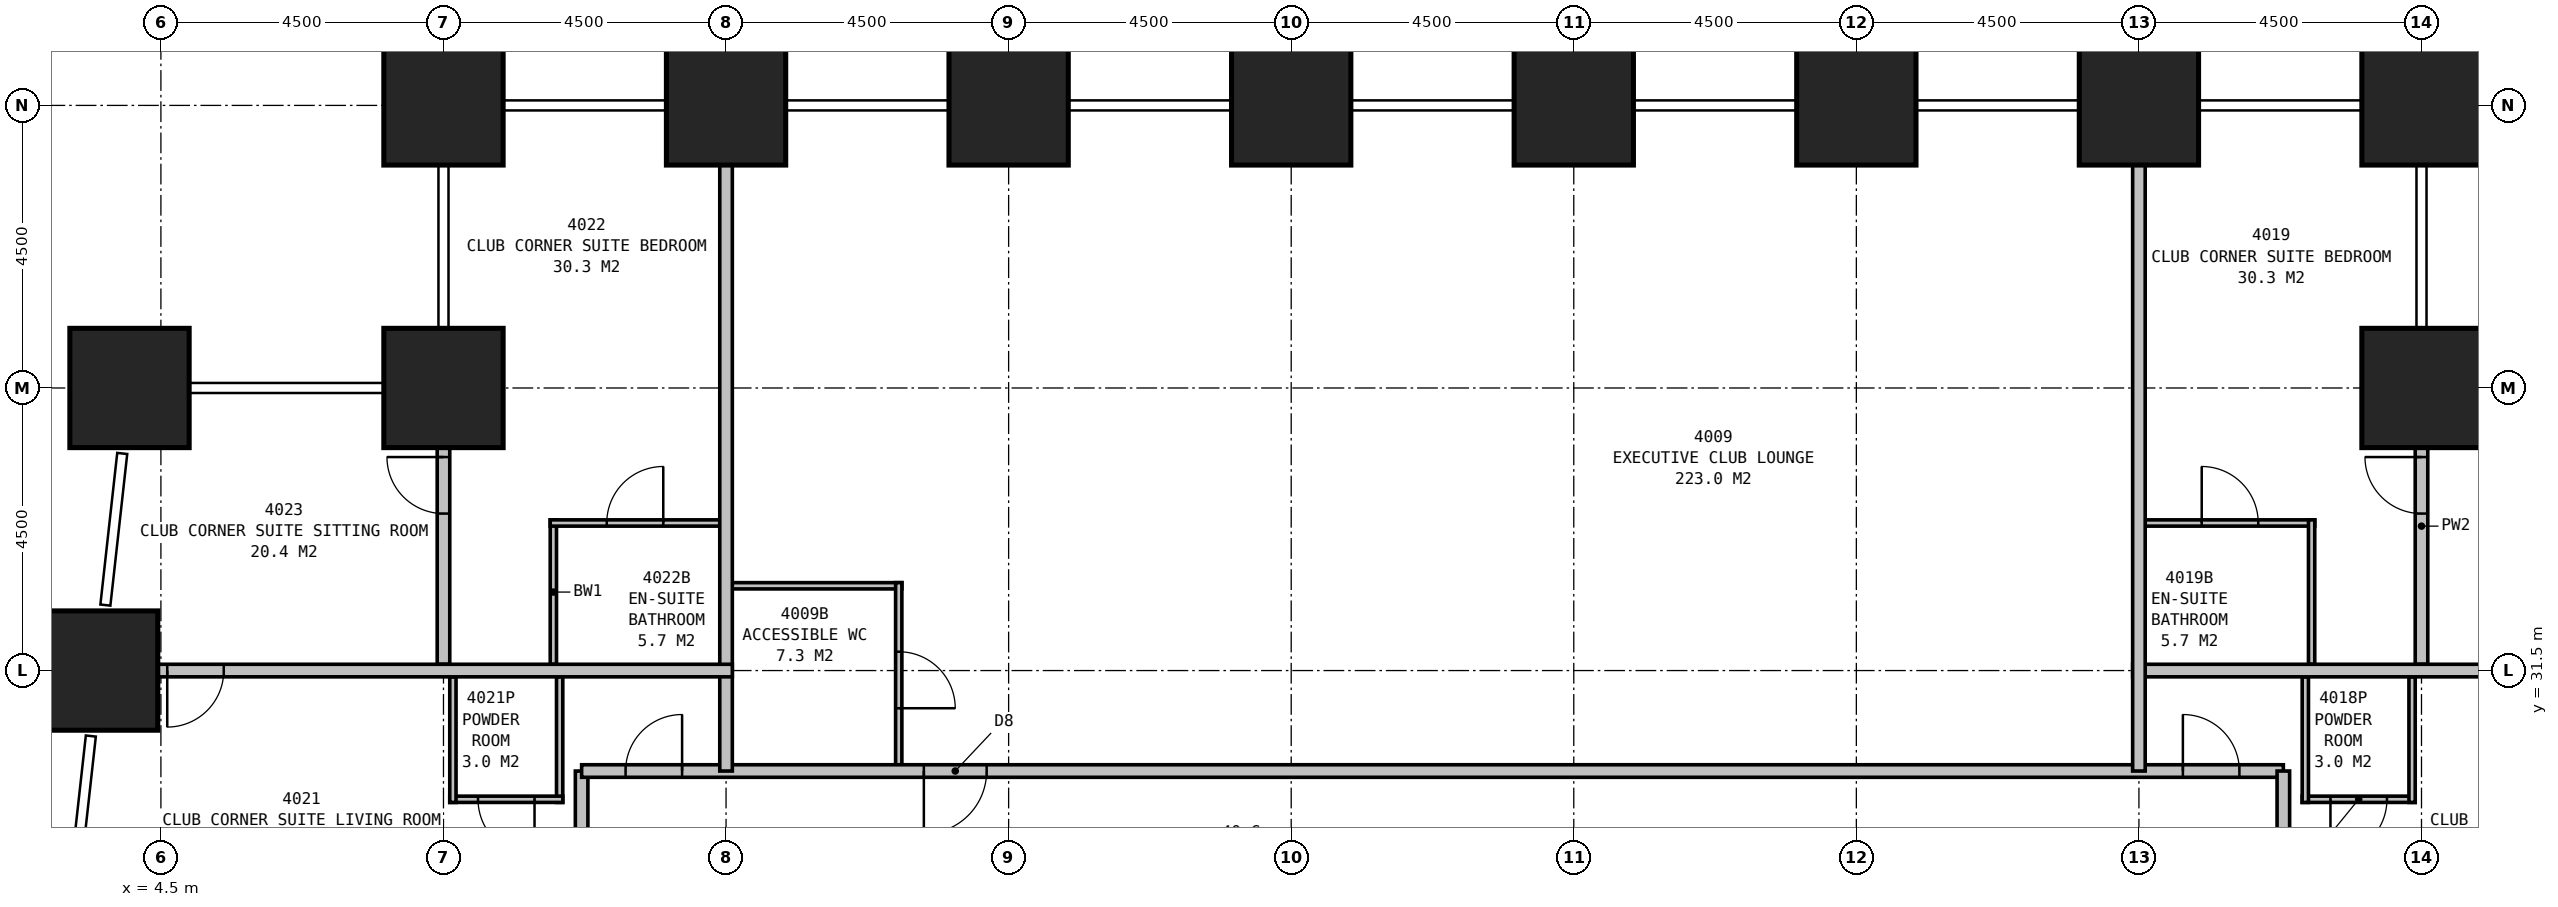
"""IFC4 building model, lengths in metres.
Left out: names, types, materials, properties, quantities, classifications, styles, units other than length and angle.
Written with IfcOpenShell. Run it as: python <this file> out.ifc"""

import sys

from ifc_helpers import new_model, si_unit, direction, frame, frame_2d, origin, origin_2d, place, context, subcontext, project, spatial, rectangle, extrude, element, fill, save


model = new_model("IFC4")
c1 = context("Model", 3, precision=1e-05, world=origin(), true_north=direction((0.0, 1.0)))
c2 = subcontext(c1, "Body", "Model", "MODEL_VIEW")
j1 = project(units=[si_unit("LENGTHUNIT", "METRE"), si_unit("PLANEANGLEUNIT", "RADIAN")], contexts=[c1])
p1 = place(None, origin())
s1 = spatial("IfcSite", under=j1, at=p1, CompositionType="ELEMENT")
p2 = place(p1, origin())
s2 = spatial("IfcBuilding", under=s1, at=p2, CompositionType="ELEMENT")
p3 = place(p2, frame((0.0, 0.0, 157.9)))
s3 = spatial("IfcBuildingStorey", under=s2, at=p3, CompositionType="ELEMENT", Elevation=157.9)
for number, where, z_axis, x_axis in (
    (1, (40.5, 36.0, 0.0), (0.0, 0.0, 1.0), (1.0, 0.0, 0.0)),
    (2, (40.5, 40.5, 0.0), (0.0, 0.0, 1.0), (1.0, 0.0, 0.0)),
    (3, (36.0, 40.5, 0.0), (0.0, 0.0, 1.0), (1.0, 0.0, 0.0)),
    (4, (31.5, 40.5, 0.0), (0.0, 0.0, 1.0), (1.0, 0.0, 0.0)),
    (5, (27.0, 40.5, 0.0), (0.0, 0.0, 1.0), (1.0, 0.0, 0.0)),
    (6, (22.5, 40.5, 0.0), (0.0, 0.0, 1.0), (1.0, 0.0, 0.0)),
    (7, (18.0, 40.5, 0.0), (0.0, 0.0, 1.0), (1.0, 0.0, 0.0)),
    (8, (13.5, 40.5, 0.0), (0.0, 0.0, 1.0), (1.0, 0.0, 0.0)),
    (9, (9.0, 40.5, 0.0), (0.0, 0.0, 1.0), (1.0, 0.0, 0.0)),
    (10, (9.0, 36.0, 0.0), (0.0, 0.0, 1.0), (1.0, 0.0, 0.0)),
    (11, (4.0, 36.0, 0.0), (0.0, 0.0, 1.0), (1.0, 0.0, 0.0)),
    (12, (3.5, 31.5, 0.0), (0.0, 0.0, 1.0), (1.0, 0.0, 0.0)),
):
    element("IfcColumn", number, at=place(p3, frame(where, z_axis=z_axis, x_axis=x_axis)), inside=s3, PredefinedType="COLUMN", context=c2, shape_type="SweptSolid", body=[
        extrude(rectangle(XDim=1.9, YDim=1.9, at=origin_2d()), origin(), (0.0, 0.0, 1.0), 4.5),
    ])
p4 = place(p3, frame((11.2, 29.9, 0.0), z_axis=(0.0, 0.0, 1.0), x_axis=(1.0, 0.0, 0.0)))
e13 = element("IfcWall", 13, at=p4, inside=s3, PredefinedType="PARTITIONING", context=c2, shape_type="SweptSolid", body=[
    extrude(rectangle(XDim=27.1, YDim=0.2, at=frame_2d((13.55, 0.0))), origin(), (0.0, 0.0, 1.0), 4.25),
])
p5 = place(p4, frame((6.45, 0.0, 0.0), z_axis=(0.0, 0.0, 1.0), x_axis=(-1.0, 0.0, 0.0)))
e14 = element("IfcOpeningElement", 14, at=p5, cuts=e13, PredefinedType="OPENING", context=c2, shape_type="SweptSolid", body=[
    extrude(rectangle(XDim=1.0, YDim=2.1, at=frame_2d((0.5, 1.05))), frame((0.0, 0.11, 0.0), z_axis=(0.0, -1.0, 0.0), x_axis=(1.0, 0.0, 0.0)), (0.0, 0.0, 1.0), 0.22),
])
p6 = place(p4, frame((25.5, 0.0, 0.0)))
e15 = element("IfcOpeningElement", 15, at=p6, cuts=e13, PredefinedType="OPENING", context=c2, shape_type="SweptSolid", body=[
    extrude(rectangle(XDim=0.9, YDim=2.1, at=frame_2d((0.45, 1.05))), frame((0.0, 0.11, 0.0), z_axis=(0.0, -1.0, 0.0), x_axis=(1.0, 0.0, 0.0)), (0.0, 0.0, 1.0), 0.22),
])
p7 = place(p4, frame((0.7, 0.0, 0.0)))
e16 = element("IfcOpeningElement", 16, at=p7, cuts=e13, PredefinedType="OPENING", context=c2, shape_type="SweptSolid", body=[
    extrude(rectangle(XDim=0.9, YDim=2.1, at=frame_2d((0.45, 1.05))), frame((0.0, 0.11, 0.0), z_axis=(0.0, -1.0, 0.0), x_axis=(1.0, 0.0, 0.0)), (0.0, 0.0, 1.0), 0.22),
])
p8 = place(p3, frame((11.2, 11.2, 0.0), z_axis=(0.0, 0.0, 1.0), x_axis=(0.0, 1.0, 0.0)))
e17 = element("IfcWall", 17, at=p8, inside=s3, PredefinedType="PARTITIONING", context=c2, shape_type="SweptSolid", body=[
    extrude(rectangle(XDim=18.7, YDim=0.2, at=frame_2d((9.35, 0.0))), origin(), (0.0, 0.0, 1.0), 4.25),
])
p9 = place(p8, frame((5.8, 0.0, 0.0)))
e18 = element("IfcOpeningElement", 18, at=p9, cuts=e17, PredefinedType="OPENING", context=c2, shape_type="SweptSolid", body=[
    extrude(rectangle(XDim=0.9, YDim=2.1, at=frame_2d((0.45, 1.05))), frame((0.0, 0.11, 0.0), z_axis=(0.0, -1.0, 0.0), x_axis=(1.0, 0.0, 0.0)), (0.0, 0.0, 1.0), 0.22),
])
p10 = place(p8, frame((9.55, 0.0, 0.0)))
e19 = element("IfcOpeningElement", 19, at=p10, cuts=e17, PredefinedType="OPENING", context=c2, shape_type="SweptSolid", body=[
    extrude(rectangle(XDim=0.9, YDim=2.1, at=frame_2d((0.45, 1.05))), frame((0.0, 0.11, 0.0), z_axis=(0.0, -1.0, 0.0), x_axis=(1.0, 0.0, 0.0)), (0.0, 0.0, 1.0), 0.22),
])
p11 = place(p3, frame((38.3, 11.2, 0.0), z_axis=(0.0, 0.0, 1.0), x_axis=(0.0, 1.0, 0.0)))
e20 = element("IfcWall", 20, at=p11, inside=s3, PredefinedType="PARTITIONING", context=c2, shape_type="SweptSolid", body=[
    extrude(rectangle(XDim=18.7, YDim=0.2, at=frame_2d((9.35, 0.0))), origin(), (0.0, 0.0, 1.0), 4.25),
])
p12 = place(p11, frame((6.35, 0.0, 0.0), z_axis=(0.0, 0.0, 1.0), x_axis=(-1.0, 0.0, 0.0)))
e21 = element("IfcOpeningElement", 21, at=p12, cuts=e20, PredefinedType="OPENING", context=c2, shape_type="SweptSolid", body=[
    extrude(rectangle(XDim=0.9, YDim=2.1, at=frame_2d((0.45, 1.05))), frame((0.0, 0.11, 0.0), z_axis=(0.0, -1.0, 0.0), x_axis=(1.0, 0.0, 0.0)), (0.0, 0.0, 1.0), 0.22),
])
p13 = place(p11, frame((10.45, 0.0, 0.0), z_axis=(0.0, 0.0, 1.0), x_axis=(-1.0, 0.0, 0.0)))
e22 = element("IfcOpeningElement", 22, at=p13, cuts=e20, PredefinedType="OPENING", context=c2, shape_type="SweptSolid", body=[
    extrude(rectangle(XDim=0.9, YDim=2.1, at=frame_2d((0.45, 1.05))), frame((0.0, 0.11, 0.0), z_axis=(0.0, -1.0, 0.0), x_axis=(1.0, 0.0, 0.0)), (0.0, 0.0, 1.0), 0.22),
])
p14 = place(p3, frame((13.5, 32.85, 0.0), z_axis=(0.0, 0.0, 1.0), x_axis=(1.0, 0.0, 0.0)))
e23 = element("IfcWall", 23, at=p14, inside=s3, PredefinedType="PLUMBINGWALL", context=c2, shape_type="SweptSolid", body=[
    extrude(rectangle(XDim=2.8, YDim=0.1, at=frame_2d((1.4, 0.0))), origin(), (0.0, 0.0, 1.0), 4.25),
])
p15 = place(p3, frame((16.25, 29.9, 0.0), z_axis=(0.0, 0.0, 1.0), x_axis=(0.0, 1.0, 0.0)))
e24 = element("IfcWall", 24, at=p15, inside=s3, PredefinedType="PLUMBINGWALL", context=c2, shape_type="SweptSolid", body=[
    extrude(rectangle(XDim=3.0, YDim=0.1, at=frame_2d((1.5, 0.0))), origin(), (0.0, 0.0, 1.0), 4.25),
])
p16 = place(p15, frame((1.9, 0.0, 0.0), z_axis=(0.0, 0.0, 1.0), x_axis=(-1.0, 0.0, 0.0)))
e25 = element("IfcOpeningElement", 25, at=p16, cuts=e24, PredefinedType="OPENING", context=c2, shape_type="SweptSolid", body=[
    extrude(rectangle(XDim=0.9, YDim=2.1, at=frame_2d((0.45, 1.05))), frame((0.0, 0.06, 0.0), z_axis=(0.0, -1.0, 0.0), x_axis=(1.0, 0.0, 0.0)), (0.0, 0.0, 1.0), 0.12),
])
p17 = place(p3, frame((36.0, 29.9, 0.0), z_axis=(0.0, 0.0, 1.0), x_axis=(0.0, 1.0, 0.0)))
e26 = element("IfcWall", 26, at=p17, inside=s3, PredefinedType="PARTITIONING", context=c2, shape_type="SweptSolid", body=[
    extrude(rectangle(XDim=10.6, YDim=0.2, at=frame_2d((5.3, 0.0))), origin(), (0.0, 0.0, 1.0), 3.25),
])
p18 = place(p3, frame((35.9, 31.5, 0.0), z_axis=(0.0, 0.0, 1.0), x_axis=(1.0, 0.0, 0.0)))
e27 = element("IfcWall", 27, at=p18, inside=s3, PredefinedType="PARTITIONING", context=c2, shape_type="SweptSolid", body=[
    extrude(rectangle(XDim=10.099, YDim=0.2, at=frame_2d((5.05, 0.0))), origin(), (0.0, 0.0, 1.0), 4.25),
])
p19 = place(p18, frame((8.099, 0.0, 0.0)))
e28 = element("IfcOpeningElement", 28, at=p19, cuts=e27, PredefinedType="OPENING", context=c2, shape_type="SweptSolid", body=[
    extrude(rectangle(XDim=0.9, YDim=2.1, at=frame_2d((0.45, 1.05))), frame((0.0, 0.11, 0.0), z_axis=(0.0, -1.0, 0.0), x_axis=(1.0, 0.0, 0.0)), (0.0, 0.0, 1.0), 0.22),
])
p20 = place(p3, frame((40.35, 31.4, 0.0), z_axis=(0.0, 0.0, 1.0), x_axis=(0.0, -1.0, 0.0)))
e29 = element("IfcWall", 29, at=p20, inside=s3, PredefinedType="PLUMBINGWALL", context=c2, shape_type="SweptSolid", body=[
    extrude(rectangle(XDim=2.0, YDim=0.1, at=frame_2d((1.0, 0.0))), origin(), (0.0, 0.0, 1.0), 3.25),
])
p21 = place(p3, frame((38.65, 31.4, 0.0), z_axis=(0.0, 0.0, 1.0), x_axis=(0.0, -1.0, 0.0)))
e30 = element("IfcWall", 30, at=p21, inside=s3, PredefinedType="PLUMBINGWALL", context=c2, shape_type="SweptSolid", body=[
    extrude(rectangle(XDim=2.0, YDim=0.1, at=frame_2d((1.0, 0.0))), origin(), (0.0, 0.0, 1.0), 4.25),
])
p22 = place(p3, frame((38.6, 29.45, 0.0), z_axis=(0.0, 0.0, 1.0), x_axis=(1.0, 0.0, 0.0)))
e31 = element("IfcWall", 31, at=p22, inside=s3, PredefinedType="PLUMBINGWALL", context=c2, shape_type="SweptSolid", body=[
    extrude(rectangle(XDim=1.8, YDim=0.1, at=frame_2d((0.9, 0.0))), origin(), (0.0, 0.0, 1.0), 4.25),
])
p23 = place(p22, frame((1.35, 0.0, 0.0), z_axis=(0.0, 0.0, 1.0), x_axis=(-1.0, 0.0, 0.0)))
e32 = element("IfcOpeningElement", 32, at=p23, cuts=e31, PredefinedType="OPENING", context=c2, shape_type="SweptSolid", body=[
    extrude(rectangle(XDim=0.9, YDim=2.1, at=frame_2d((0.45, 1.05))), frame((0.0, 0.06, 0.0), z_axis=(0.0, -1.0, 0.0), x_axis=(1.0, 0.0, 0.0)), (0.0, 0.0, 1.0), 0.12),
])
p24 = place(p3, frame((40.5, 31.6, 0.0), z_axis=(0.0, 0.0, 1.0), x_axis=(0.0, 1.0, 0.0)))
e33 = element("IfcWall", 33, at=p24, inside=s3, PredefinedType="PARTITIONING", context=c2, shape_type="SweptSolid", body=[
    extrude(rectangle(XDim=4.4, YDim=0.2, at=frame_2d((2.2, 0.0))), origin(), (0.0, 0.0, 1.0), 3.25),
])
p25 = place(p24, frame((2.4, 0.0, 0.0)))
e34 = element("IfcOpeningElement", 34, at=p25, cuts=e33, PredefinedType="OPENING", context=c2, shape_type="SweptSolid", body=[
    extrude(rectangle(XDim=0.9, YDim=2.1, at=frame_2d((0.45, 1.05))), frame((0.0, 0.11, 0.0), z_axis=(0.0, -1.0, 0.0), x_axis=(1.0, 0.0, 0.0)), (0.0, 0.0, 1.0), 0.22),
])
p26 = place(p3, frame((38.75, 31.6, 0.0), z_axis=(0.0, 0.0, 1.0), x_axis=(0.0, 1.0, 0.0)))
e35 = element("IfcWall", 35, at=p26, inside=s3, PredefinedType="PLUMBINGWALL", context=c2, shape_type="SweptSolid", body=[
    extrude(rectangle(XDim=2.3, YDim=0.1, at=frame_2d((1.15, 0.0))), origin(), (0.0, 0.0, 1.0), 4.25),
])
p27 = place(p3, frame((36.1, 33.85, 0.0), z_axis=(0.0, 0.0, 1.0), x_axis=(1.0, 0.0, 0.0)))
e36 = element("IfcWall", 36, at=p27, inside=s3, PredefinedType="PLUMBINGWALL", context=c2, shape_type="SweptSolid", body=[
    extrude(rectangle(XDim=2.7, YDim=0.1, at=frame_2d((1.35, 0.0))), origin(), (0.0, 0.0, 1.0), 4.25),
])
p28 = place(p27, frame((0.9, 0.0, 0.0)))
e37 = element("IfcOpeningElement", 37, at=p28, cuts=e36, PredefinedType="OPENING", context=c2, shape_type="SweptSolid", body=[
    extrude(rectangle(XDim=0.9, YDim=2.1, at=frame_2d((0.45, 1.05))), frame((0.0, 0.06, 0.0), z_axis=(0.0, -1.0, 0.0), x_axis=(1.0, 0.0, 0.0)), (0.0, 0.0, 1.0), 0.12),
])
p29 = place(p3, frame((13.5, 29.9, 0.0), z_axis=(0.0, 0.0, 1.0), x_axis=(0.0, 1.0, 0.0)))
e38 = element("IfcWall", 38, at=p29, inside=s3, PredefinedType="PARTITIONING", context=c2, shape_type="SweptSolid", body=[
    extrude(rectangle(XDim=10.6, YDim=0.2, at=frame_2d((5.3, 0.0))), origin(), (0.0, 0.0, 1.0), 3.25),
])
p30 = place(p3, frame((13.6, 31.5, 0.0), z_axis=(0.0, 0.0, 1.0), x_axis=(-1.0, 0.0, 0.0)))
e39 = element("IfcWall", 39, at=p30, inside=s3, PredefinedType="PARTITIONING", context=c2, shape_type="SweptSolid", body=[
    extrude(rectangle(XDim=10.099, YDim=0.2, at=frame_2d((5.05, 0.0))), origin(), (0.0, 0.0, 1.0), 4.25),
])
p31 = place(p30, frame((8.099, 0.0, 0.0)))
e40 = element("IfcOpeningElement", 40, at=p31, cuts=e39, PredefinedType="OPENING", context=c2, shape_type="SweptSolid", body=[
    extrude(rectangle(XDim=0.9, YDim=2.1, at=frame_2d((0.45, 1.05))), frame((0.0, 0.11, 0.0), z_axis=(0.0, -1.0, 0.0), x_axis=(1.0, 0.0, 0.0)), (0.0, 0.0, 1.0), 0.22),
])
p32 = place(p3, frame((9.15, 31.4, 0.0), z_axis=(0.0, 0.0, 1.0), x_axis=(0.0, -1.0, 0.0)))
e41 = element("IfcWall", 41, at=p32, inside=s3, PredefinedType="PLUMBINGWALL", context=c2, shape_type="SweptSolid", body=[
    extrude(rectangle(XDim=2.0, YDim=0.1, at=frame_2d((1.0, 0.0))), origin(), (0.0, 0.0, 1.0), 3.25),
])
p33 = place(p3, frame((10.85, 31.4, 0.0), z_axis=(0.0, 0.0, 1.0), x_axis=(0.0, -1.0, 0.0)))
e42 = element("IfcWall", 42, at=p33, inside=s3, PredefinedType="PLUMBINGWALL", context=c2, shape_type="SweptSolid", body=[
    extrude(rectangle(XDim=2.0, YDim=0.1, at=frame_2d((1.0, 0.0))), origin(), (0.0, 0.0, 1.0), 4.25),
])
p34 = place(p3, frame((10.9, 29.45, 0.0), z_axis=(0.0, 0.0, 1.0), x_axis=(-1.0, 0.0, 0.0)))
e43 = element("IfcWall", 43, at=p34, inside=s3, PredefinedType="PLUMBINGWALL", context=c2, shape_type="SweptSolid", body=[
    extrude(rectangle(XDim=1.8, YDim=0.1, at=frame_2d((0.9, 0.0))), origin(), (0.0, 0.0, 1.0), 4.25),
])
p35 = place(p34, frame((0.45, 0.0, 0.0)))
e44 = element("IfcOpeningElement", 44, at=p35, cuts=e43, PredefinedType="OPENING", context=c2, shape_type="SweptSolid", body=[
    extrude(rectangle(XDim=0.9, YDim=2.1, at=frame_2d((0.45, 1.05))), frame((0.0, 0.06, 0.0), z_axis=(0.0, -1.0, 0.0), x_axis=(1.0, 0.0, 0.0)), (0.0, 0.0, 1.0), 0.12),
])
p36 = place(p3, frame((9.0, 31.6, 0.0), z_axis=(0.0, 0.0, 1.0), x_axis=(0.0, 1.0, 0.0)))
e45 = element("IfcWall", 45, at=p36, inside=s3, PredefinedType="PARTITIONING", context=c2, shape_type="SweptSolid", body=[
    extrude(rectangle(XDim=4.4, YDim=0.2, at=frame_2d((2.2, 0.0))), origin(), (0.0, 0.0, 1.0), 3.25),
])
p37 = place(p36, frame((2.4, 0.0, 0.0)))
e46 = element("IfcOpeningElement", 46, at=p37, cuts=e45, PredefinedType="OPENING", context=c2, shape_type="SweptSolid", body=[
    extrude(rectangle(XDim=0.9, YDim=2.1, at=frame_2d((0.45, 1.05))), frame((0.0, 0.11, 0.0), z_axis=(0.0, -1.0, 0.0), x_axis=(1.0, 0.0, 0.0)), (0.0, 0.0, 1.0), 0.22),
])
p38 = place(p3, frame((10.75, 31.6, 0.0), z_axis=(0.0, 0.0, 1.0), x_axis=(0.0, 1.0, 0.0)))
e47 = element("IfcWall", 47, at=p38, inside=s3, PredefinedType="PLUMBINGWALL", context=c2, shape_type="SweptSolid", body=[
    extrude(rectangle(XDim=2.3, YDim=0.1, at=frame_2d((1.15, 0.0))), origin(), (0.0, 0.0, 1.0), 4.25),
])
p39 = place(p3, frame((13.4, 33.85, 0.0), z_axis=(0.0, 0.0, 1.0), x_axis=(-1.0, 0.0, 0.0)))
e48 = element("IfcWall", 48, at=p39, inside=s3, PredefinedType="PLUMBINGWALL", context=c2, shape_type="SweptSolid", body=[
    extrude(rectangle(XDim=2.7, YDim=0.1, at=frame_2d((1.35, 0.0))), origin(), (0.0, 0.0, 1.0), 4.25),
])
p40 = place(p39, frame((1.8, 0.0, 0.0), z_axis=(0.0, 0.0, 1.0), x_axis=(-1.0, 0.0, 0.0)))
e49 = element("IfcOpeningElement", 49, at=p40, cuts=e48, PredefinedType="OPENING", context=c2, shape_type="SweptSolid", body=[
    extrude(rectangle(XDim=0.9, YDim=2.1, at=frame_2d((0.45, 1.05))), frame((0.0, 0.06, 0.0), z_axis=(0.0, -1.0, 0.0), x_axis=(1.0, 0.0, 0.0)), (0.0, 0.0, 1.0), 0.12),
])
p41 = place(p5, origin())
e50 = element("IfcDoor", 50, at=p41, inside=s3, OperationType="SINGLE_SWING_RIGHT", PredefinedType="DOOR", context=c2, shape_type="SweptSolid", body=[
    extrude(rectangle(XDim=1.0, YDim=2.1, at=frame_2d((0.5, 1.05))), frame((0.0, 0.025, 0.0), z_axis=(0.0, -1.0, 0.0), x_axis=(1.0, 0.0, 0.0)), (0.0, 0.0, 1.0), 0.05),
])
fill(e14, e50)
p42 = place(p6, origin())
e51 = element("IfcDoor", 51, at=p42, inside=s3, OperationType="SINGLE_SWING_LEFT", PredefinedType="DOOR", context=c2, shape_type="SweptSolid", body=[
    extrude(rectangle(XDim=0.9, YDim=2.1, at=frame_2d((0.45, 1.05))), frame((0.0, 0.025, 0.0), z_axis=(0.0, -1.0, 0.0), x_axis=(1.0, 0.0, 0.0)), (0.0, 0.0, 1.0), 0.05),
])
fill(e15, e51)
p43 = place(p7, origin())
e52 = element("IfcDoor", 52, at=p43, inside=s3, OperationType="SINGLE_SWING_RIGHT", PredefinedType="DOOR", context=c2, shape_type="SweptSolid", body=[
    extrude(rectangle(XDim=0.9, YDim=2.1, at=frame_2d((0.45, 1.05))), frame((0.0, 0.025, 0.0), z_axis=(0.0, -1.0, 0.0), x_axis=(1.0, 0.0, 0.0)), (0.0, 0.0, 1.0), 0.05),
])
fill(e16, e52)
p44 = place(p16, origin())
e53 = element("IfcDoor", 53, at=p44, inside=s3, OperationType="SINGLE_SWING_RIGHT", PredefinedType="DOOR", context=c2, shape_type="SweptSolid", body=[
    extrude(rectangle(XDim=0.9, YDim=2.1, at=frame_2d((0.45, 1.05))), frame((0.0, 0.025, 0.0), z_axis=(0.0, -1.0, 0.0), x_axis=(1.0, 0.0, 0.0)), (0.0, 0.0, 1.0), 0.05),
])
fill(e25, e53)
p45 = place(p23, origin())
e54 = element("IfcDoor", 54, at=p45, inside=s3, OperationType="SINGLE_SWING_RIGHT", PredefinedType="DOOR", context=c2, shape_type="SweptSolid", body=[
    extrude(rectangle(XDim=0.9, YDim=2.1, at=frame_2d((0.45, 1.05))), frame((0.0, 0.025, 0.0), z_axis=(0.0, -1.0, 0.0), x_axis=(1.0, 0.0, 0.0)), (0.0, 0.0, 1.0), 0.05),
])
fill(e32, e54)
p46 = place(p25, origin())
e55 = element("IfcDoor", 55, at=p46, inside=s3, OperationType="SINGLE_SWING_RIGHT", PredefinedType="DOOR", context=c2, shape_type="SweptSolid", body=[
    extrude(rectangle(XDim=0.9, YDim=2.1, at=frame_2d((0.45, 1.05))), frame((0.0, 0.025, 0.0), z_axis=(0.0, -1.0, 0.0), x_axis=(1.0, 0.0, 0.0)), (0.0, 0.0, 1.0), 0.05),
])
fill(e34, e55)
p47 = place(p28, origin())
e56 = element("IfcDoor", 56, at=p47, inside=s3, OperationType="SINGLE_SWING_LEFT", PredefinedType="DOOR", context=c2, shape_type="SweptSolid", body=[
    extrude(rectangle(XDim=0.9, YDim=2.1, at=frame_2d((0.45, 1.05))), frame((0.0, 0.025, 0.0), z_axis=(0.0, -1.0, 0.0), x_axis=(1.0, 0.0, 0.0)), (0.0, 0.0, 1.0), 0.05),
])
fill(e37, e56)
p48 = place(p31, origin())
e57 = element("IfcDoor", 57, at=p48, inside=s3, OperationType="SINGLE_SWING_RIGHT", PredefinedType="DOOR", context=c2, shape_type="SweptSolid", body=[
    extrude(rectangle(XDim=0.9, YDim=2.1, at=frame_2d((0.45, 1.05))), frame((0.0, 0.025, 0.0), z_axis=(0.0, -1.0, 0.0), x_axis=(1.0, 0.0, 0.0)), (0.0, 0.0, 1.0), 0.05),
])
fill(e40, e57)
p49 = place(p35, origin())
e58 = element("IfcDoor", 58, at=p49, inside=s3, OperationType="SINGLE_SWING_LEFT", PredefinedType="DOOR", context=c2, shape_type="SweptSolid", body=[
    extrude(rectangle(XDim=0.9, YDim=2.1, at=frame_2d((0.45, 1.05))), frame((0.0, 0.025, 0.0), z_axis=(0.0, -1.0, 0.0), x_axis=(1.0, 0.0, 0.0)), (0.0, 0.0, 1.0), 0.05),
])
fill(e44, e58)
p50 = place(p37, origin())
e59 = element("IfcDoor", 59, at=p50, inside=s3, OperationType="SINGLE_SWING_RIGHT", PredefinedType="DOOR", context=c2, shape_type="SweptSolid", body=[
    extrude(rectangle(XDim=0.9, YDim=2.1, at=frame_2d((0.45, 1.05))), frame((0.0, 0.025, 0.0), z_axis=(0.0, -1.0, 0.0), x_axis=(1.0, 0.0, 0.0)), (0.0, 0.0, 1.0), 0.05),
])
fill(e46, e59)
p51 = place(p40, origin())
e60 = element("IfcDoor", 60, at=p51, inside=s3, OperationType="SINGLE_SWING_RIGHT", PredefinedType="DOOR", context=c2, shape_type="SweptSolid", body=[
    extrude(rectangle(XDim=0.9, YDim=2.1, at=frame_2d((0.45, 1.05))), frame((0.0, 0.025, 0.0), z_axis=(0.0, -1.0, 0.0), x_axis=(1.0, 0.0, 0.0)), (0.0, 0.0, 1.0), 0.05),
])
fill(e49, e60)
save(model, sys.argv[1])
